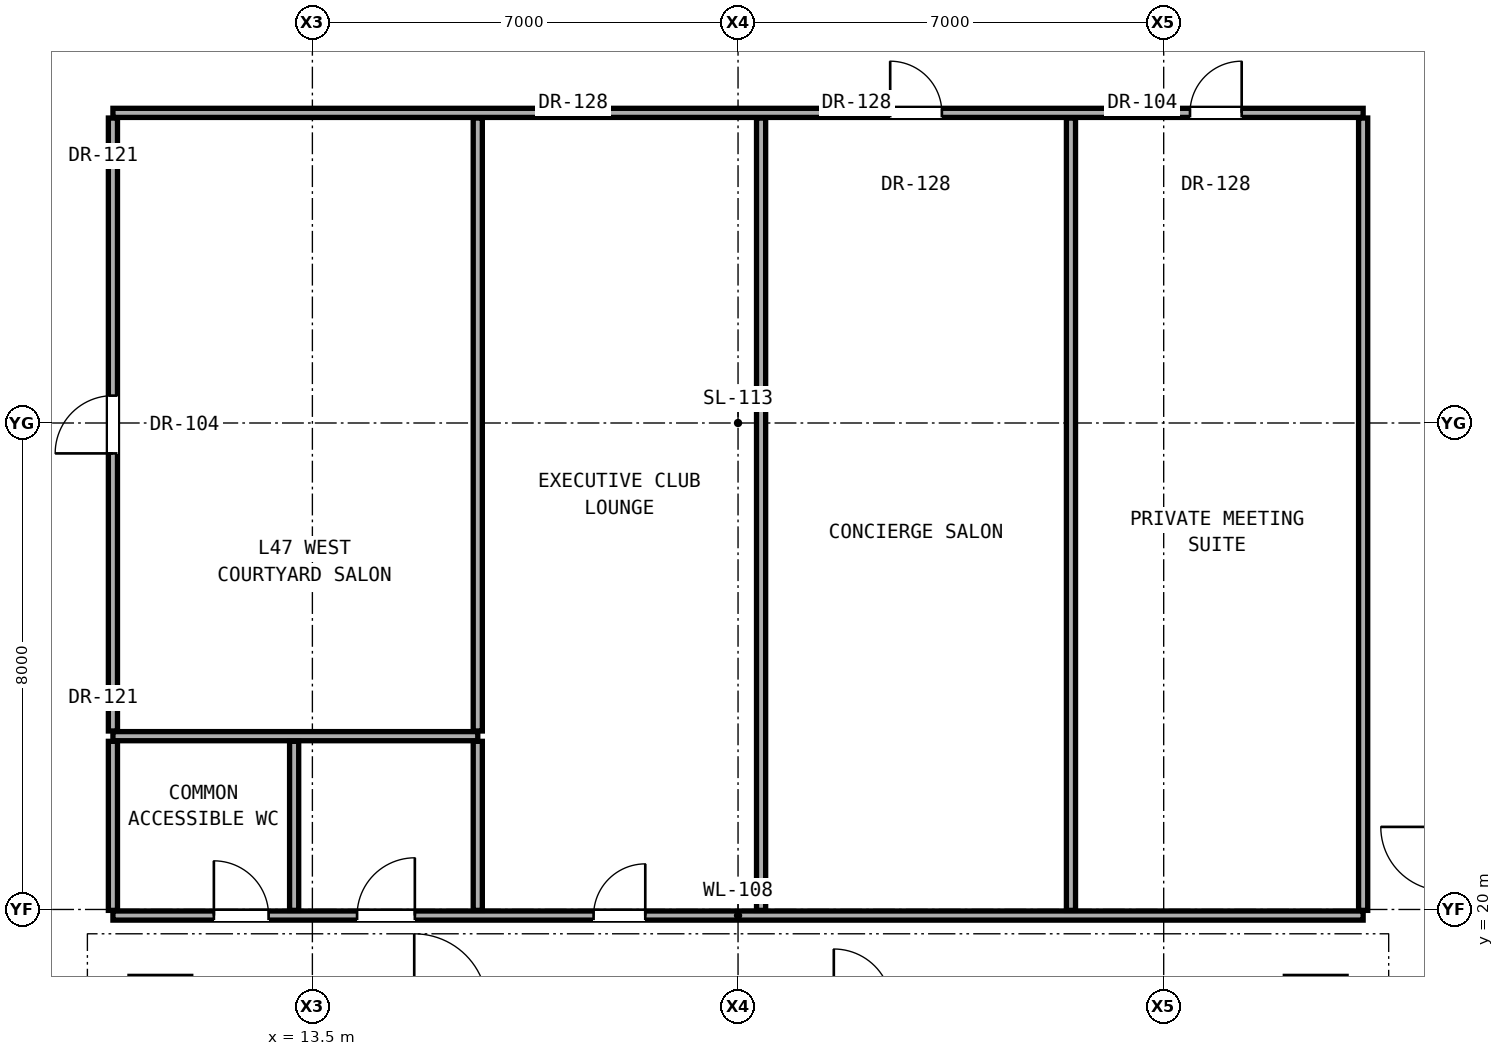
"""IFC4 building model, lengths in metres.
Left out: names, types, materials, properties, quantities, classifications, styles, units other than length and angle.
Written with IfcOpenShell. Run it as: python <this file> out.ifc"""

import sys

from ifc_helpers import new_model, si_unit, direction, frame, frame_2d, origin, place, context, subcontext, project, spatial, rectangle, extrude, element, fill, save


model = new_model("IFC4")
c1 = context("Model", 3, precision=1e-05, world=origin(), true_north=direction((0.0, 1.0)))
c2 = subcontext(c1, "Body", "Model", "MODEL_VIEW")
j1 = project(units=[si_unit("LENGTHUNIT", "METRE"), si_unit("PLANEANGLEUNIT", "RADIAN")], contexts=[c1])
p1 = place(None, origin())
s1 = spatial("IfcSite", under=j1, at=p1, CompositionType="ELEMENT")
p2 = place(p1, origin())
s2 = spatial("IfcBuilding", under=s1, at=p2, CompositionType="ELEMENT")
p3 = place(p2, frame((0.0, 0.0, 167.4)))
s3 = spatial("IfcBuildingStorey", under=s2, at=p3, CompositionType="ELEMENT", Elevation=167.4)
p4 = place(p3, frame((10.22, 19.9, 0.0), z_axis=(0.0, 0.0, 1.0), x_axis=(1.0, 0.0, 0.0)))
e1 = element("IfcWall", 1, at=p4, inside=s3, PredefinedType="PARTITIONING", context=c2, shape_type="SweptSolid", body=[
    extrude(rectangle(XDim=20.56, YDim=0.15, at=frame_2d((10.28, 0.0))), origin(), (0.0, 0.0, 1.0), 2.186),
])
p5 = place(p4, frame((1.66, 0.0, 0.0)))
e2 = element("IfcOpeningElement", 2, at=p5, cuts=e1, PredefinedType="OPENING", context=c2, shape_type="SweptSolid", body=[
    extrude(rectangle(XDim=0.9, YDim=2.1, at=frame_2d((0.45, 1.05))), frame((0.0, 0.085, 0.0), z_axis=(0.0, -1.0, 0.0), x_axis=(1.0, 0.0, 0.0)), (0.0, 0.0, 1.0), 0.17),
])
p6 = place(p4, frame((4.015, 0.0, 0.0)))
e3 = element("IfcOpeningElement", 3, at=p6, cuts=e1, PredefinedType="OPENING", context=c2, shape_type="SweptSolid", body=[
    extrude(rectangle(XDim=0.95, YDim=2.15, at=frame_2d((0.475, 1.075))), frame((0.0, 0.085, 0.0), z_axis=(0.0, -1.0, 0.0), x_axis=(1.0, 0.0, 0.0)), (0.0, 0.0, 1.0), 0.17),
])
p7 = place(p4, frame((7.905, 0.0, 0.0)))
e4 = element("IfcOpeningElement", 4, at=p7, cuts=e1, PredefinedType="OPENING", context=c2, shape_type="SweptSolid", body=[
    extrude(rectangle(XDim=0.85, YDim=2.01, at=frame_2d((0.425, 1.005))), frame((0.0, 0.085, 0.0), z_axis=(0.0, -1.0, 0.0), x_axis=(1.0, 0.0, 0.0)), (0.0, 0.0, 1.0), 0.17),
])
p8 = place(p3, frame((10.22, 22.85, 0.0), z_axis=(0.0, 0.0, 1.0), x_axis=(1.0, 0.0, 0.0)))
e5 = element("IfcWall", 5, at=p8, inside=s3, PredefinedType="PARTITIONING", context=c2, shape_type="SweptSolid", body=[
    extrude(rectangle(XDim=6.0, YDim=0.15, at=frame_2d((3.0, 0.0))), origin(), (0.0, 0.0, 1.0), 2.186),
])
p9 = place(p3, frame((10.22, 33.1, 0.0), z_axis=(0.0, 0.0, 1.0), x_axis=(1.0, 0.0, 0.0)))
e6 = element("IfcWall", 6, at=p9, inside=s3, PredefinedType="PARTITIONING", context=c2, shape_type="SweptSolid", body=[
    extrude(rectangle(XDim=20.56, YDim=0.15, at=frame_2d((10.28, 0.0))), origin(), (0.0, 0.0, 1.0), 2.186),
])
p10 = place(p9, frame((12.782, 0.0, 0.0)))
e7 = element("IfcOpeningElement", 7, at=p10, cuts=e6, PredefinedType="OPENING", context=c2, shape_type="SweptSolid", body=[
    extrude(rectangle(XDim=0.85, YDim=2.01, at=frame_2d((0.425, 1.005))), frame((0.0, 0.085, 0.0), z_axis=(0.0, -1.0, 0.0), x_axis=(1.0, 0.0, 0.0)), (0.0, 0.0, 1.0), 0.17),
])
p11 = place(p9, frame((17.712, 0.0, 0.0)))
e8 = element("IfcOpeningElement", 8, at=p11, cuts=e6, PredefinedType="OPENING", context=c2, shape_type="SweptSolid", body=[
    extrude(rectangle(XDim=0.85, YDim=2.01, at=frame_2d((0.425, 1.005))), frame((0.0, 0.085, 0.0), z_axis=(0.0, -1.0, 0.0), x_axis=(1.0, 0.0, 0.0)), (0.0, 0.0, 1.0), 0.17),
])
p12 = place(p3, frame((10.22, 19.985, 0.0), z_axis=(0.0, 0.0, 1.0), x_axis=(0.0, 1.0, 0.0)))
e9 = element("IfcWall", 9, at=p12, inside=s3, PredefinedType="PARTITIONING", context=c2, shape_type="SweptSolid", body=[
    extrude(rectangle(XDim=2.78, YDim=0.15, at=frame_2d((1.39, 0.0))), origin(), (0.0, 0.0, 1.0), 3.05),
])
p13 = place(p3, frame((10.22, 22.935, 0.0), z_axis=(0.0, 0.0, 1.0), x_axis=(0.0, 1.0, 0.0)))
e10 = element("IfcWall", 10, at=p13, inside=s3, PredefinedType="PARTITIONING", context=c2, shape_type="SweptSolid", body=[
    extrude(rectangle(XDim=10.08, YDim=0.15, at=frame_2d((5.04, 0.0))), origin(), (0.0, 0.0, 1.0), 2.346),
])
p14 = place(p13, frame((4.565, 0.0, 0.0)))
e11 = element("IfcOpeningElement", 11, at=p14, cuts=e10, PredefinedType="OPENING", context=c2, shape_type="SweptSolid", body=[
    extrude(rectangle(XDim=0.95, YDim=2.15, at=frame_2d((0.475, 1.075))), frame((0.0, 0.085, 0.0), z_axis=(0.0, -1.0, 0.0), x_axis=(1.0, 0.0, 0.0)), (0.0, 0.0, 1.0), 0.17),
])
for number, where, z_axis, x_axis in (
    (12, (13.2, 19.985, 0.0), (0.0, 0.0, 1.0), (0.0, 1.0, 0.0)),
    (13, (16.22, 19.985, 0.0), (0.0, 0.0, 1.0), (0.0, 1.0, 0.0)),
):
    element("IfcWall", number, at=place(p3, frame(where, z_axis=z_axis, x_axis=x_axis)), inside=s3, PredefinedType="PARTITIONING", context=c2, shape_type="SweptSolid", body=[
        extrude(rectangle(XDim=2.78, YDim=0.15, at=frame_2d((1.39, 0.0))), origin(), (0.0, 0.0, 1.0), 3.05),
    ])
p15 = place(p3, frame((16.22, 22.935, 0.0), z_axis=(0.0, 0.0, 1.0), x_axis=(0.0, 1.0, 0.0)))
e14 = element("IfcWall", 14, at=p15, inside=s3, PredefinedType="PARTITIONING", context=c2, shape_type="SweptSolid", body=[
    extrude(rectangle(XDim=10.08, YDim=0.15, at=frame_2d((5.04, 0.0))), origin(), (0.0, 0.0, 1.0), 2.186),
])
for number, where, z_axis, x_axis in (
    (15, (20.879, 19.985, 0.0), (0.0, 0.0, 1.0), (0.0, 1.0, 0.0)),
    (16, (25.975, 19.985, 0.0), (0.0, 0.0, 1.0), (0.0, 1.0, 0.0)),
):
    element("IfcWall", number, at=place(p3, frame(where, z_axis=z_axis, x_axis=x_axis)), inside=s3, PredefinedType="PARTITIONING", context=c2, shape_type="SweptSolid", body=[
        extrude(rectangle(XDim=13.03, YDim=0.15, at=frame_2d((6.515, 0.0))), origin(), (0.0, 0.0, 1.0), 2.186),
    ])
p16 = place(p3, frame((30.78, 19.985, 0.0), z_axis=(0.0, 0.0, 1.0), x_axis=(0.0, 1.0, 0.0)))
e17 = element("IfcWall", 17, at=p16, inside=s3, PredefinedType="PARTITIONING", context=c2, shape_type="SweptSolid", body=[
    extrude(rectangle(XDim=13.03, YDim=0.15, at=frame_2d((6.515, 0.0))), origin(), (0.0, 0.0, 1.0), 2.346),
])
p17 = place(p5, origin())
e18 = element("IfcDoor", 18, at=p17, inside=s3, OperationType="SINGLE_SWING_LEFT", PredefinedType="DOOR", context=c2, shape_type="SweptSolid", body=[
    extrude(rectangle(XDim=0.9, YDim=2.1, at=frame_2d((0.45, 1.05))), frame((0.0, 0.025, 0.0), z_axis=(0.0, -1.0, 0.0), x_axis=(1.0, 0.0, 0.0)), (0.0, 0.0, 1.0), 0.05),
])
fill(e2, e18)
p18 = place(p6, origin())
e19 = element("IfcDoor", 19, at=p18, inside=s3, OperationType="SINGLE_SWING_RIGHT", PredefinedType="DOOR", context=c2, shape_type="SweptSolid", body=[
    extrude(rectangle(XDim=0.95, YDim=2.15, at=frame_2d((0.475, 1.075))), frame((0.0, 0.025, 0.0), z_axis=(0.0, -1.0, 0.0), x_axis=(1.0, 0.0, 0.0)), (0.0, 0.0, 1.0), 0.05),
])
fill(e3, e19)
p19 = place(p14, origin())
e20 = element("IfcDoor", 20, at=p19, inside=s3, OperationType="SINGLE_SWING_LEFT", PredefinedType="DOOR", context=c2, shape_type="SweptSolid", body=[
    extrude(rectangle(XDim=0.95, YDim=2.15, at=frame_2d((0.475, 1.075))), frame((0.0, 0.025, 0.0), z_axis=(0.0, -1.0, 0.0), x_axis=(1.0, 0.0, 0.0)), (0.0, 0.0, 1.0), 0.05),
])
fill(e11, e20)
p20 = place(p7, origin())
e21 = element("IfcDoor", 21, at=p20, inside=s3, OperationType="SINGLE_SWING_RIGHT", PredefinedType="DOOR", context=c2, shape_type="SweptSolid", body=[
    extrude(rectangle(XDim=0.85, YDim=2.01, at=frame_2d((0.425, 1.005))), frame((0.0, 0.025, 0.0), z_axis=(0.0, -1.0, 0.0), x_axis=(1.0, 0.0, 0.0)), (0.0, 0.0, 1.0), 0.05),
])
fill(e4, e21)
p21 = place(p10, origin())
e22 = element("IfcDoor", 22, at=p21, inside=s3, OperationType="SINGLE_SWING_LEFT", PredefinedType="DOOR", context=c2, shape_type="SweptSolid", body=[
    extrude(rectangle(XDim=0.85, YDim=2.01, at=frame_2d((0.425, 1.005))), frame((0.0, 0.025, 0.0), z_axis=(0.0, -1.0, 0.0), x_axis=(1.0, 0.0, 0.0)), (0.0, 0.0, 1.0), 0.05),
])
fill(e7, e22)
p22 = place(p11, origin())
e23 = element("IfcDoor", 23, at=p22, inside=s3, OperationType="SINGLE_SWING_RIGHT", PredefinedType="DOOR", context=c2, shape_type="SweptSolid", body=[
    extrude(rectangle(XDim=0.85, YDim=2.01, at=frame_2d((0.425, 1.005))), frame((0.0, 0.025, 0.0), z_axis=(0.0, -1.0, 0.0), x_axis=(1.0, 0.0, 0.0)), (0.0, 0.0, 1.0), 0.05),
])
fill(e8, e23)
save(model, sys.argv[1])
